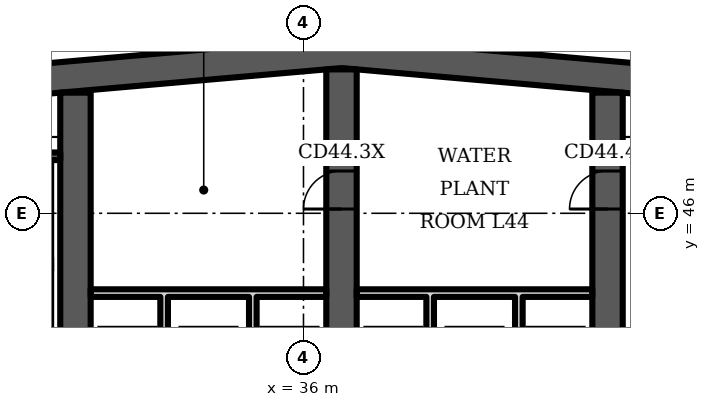
"""IFC4 building model, lengths in metres.
Left out: names, types, materials, properties, quantities, classifications, styles, units other than length and angle.
Written with IfcOpenShell. Run it as: python <this file> out.ifc"""

import sys

from ifc_helpers import new_model, si_unit, direction, frame, frame_2d, origin, place, context, subcontext, project, spatial, polyline, rectangle, outline, extrude, element, fill, save


model = new_model("IFC4")
c1 = context("Model", 3, precision=1e-05, world=origin(), true_north=direction((0.0, 1.0)))
c2 = subcontext(c1, "Body", "Model", "MODEL_VIEW")
j1 = project(units=[si_unit("LENGTHUNIT", "METRE"), si_unit("PLANEANGLEUNIT", "RADIAN")], contexts=[c1])
p1 = place(None, origin())
s1 = spatial("IfcSite", under=j1, at=p1, CompositionType="ELEMENT")
p2 = place(p1, origin())
s2 = spatial("IfcBuilding", under=s1, at=p2, CompositionType="ELEMENT")
p3 = place(p2, frame((0.0, 0.0, 180.7)))
s3 = spatial("IfcBuildingStorey", under=s2, at=p3, CompositionType="ELEMENT", Elevation=180.7)
p4 = place(p3, origin())
e1 = element("IfcWall", 1, at=p4, inside=s3, PredefinedType="SHEAR", context=c2, shape_type="SweptSolid", body=[
    extrude(outline(polyline([(16.0, 47.984), (37.0, 49.822), (58.0, 47.984), (58.0, 48.787), (37.0, 50.625), (16.0, 48.787), (16.0, 47.984)])), origin(), (0.0, 0.0, 1.0), 3.6),
])
p5 = place(p3, frame((30.0, 34.8, 0.0), z_axis=(0.0, 0.0, 1.0), x_axis=(0.0, 1.0, 0.0)))
e2 = element("IfcWall", 2, at=p5, inside=s3, PredefinedType="SHEAR", context=c2, shape_type="SweptSolid", body=[
    extrude(rectangle(XDim=14.374, YDim=0.8, at=frame_2d((7.187, 0.0))), origin(), (0.0, 0.0, 1.0), 3.6),
])
p6 = place(p5, frame((3.6, 0.0, 0.0)))
e3 = element("IfcOpeningElement", 3, at=p6, cuts=e2, PredefinedType="OPENING", context=c2, shape_type="SweptSolid", body=[
    extrude(rectangle(XDim=1.1, YDim=2.1, at=frame_2d((0.55, 1.05))), frame((0.0, 0.41, 0.0), z_axis=(0.0, -1.0, 0.0), x_axis=(1.0, 0.0, 0.0)), (0.0, 0.0, 1.0), 0.82),
])
p7 = place(p3, frame((37.0, 34.8, 0.0), z_axis=(0.0, 0.0, 1.0), x_axis=(0.0, 1.0, 0.0)))
e4 = element("IfcWall", 4, at=p7, inside=s3, PredefinedType="SHEAR", context=c2, shape_type="SweptSolid", body=[
    extrude(rectangle(XDim=14.987, YDim=0.8, at=frame_2d((7.493, 0.0))), origin(), (0.0, 0.0, 1.0), 3.6),
])
p8 = place(p7, frame((11.312, 0.0, 0.0)))
e5 = element("IfcOpeningElement", 5, at=p8, cuts=e4, PredefinedType="OPENING", context=c2, shape_type="SweptSolid", body=[
    extrude(rectangle(XDim=1.0, YDim=2.1, at=frame_2d((0.5, 1.05))), frame((0.0, 0.41, 0.0), z_axis=(0.0, -1.0, 0.0), x_axis=(1.0, 0.0, 0.0)), (0.0, 0.0, 1.0), 0.82),
])
p9 = place(p7, frame((3.6, 0.0, 0.0)))
e6 = element("IfcOpeningElement", 6, at=p9, cuts=e4, PredefinedType="OPENING", context=c2, shape_type="SweptSolid", body=[
    extrude(rectangle(XDim=1.1, YDim=2.1, at=frame_2d((0.55, 1.05))), frame((0.0, 0.41, 0.0), z_axis=(0.0, -1.0, 0.0), x_axis=(1.0, 0.0, 0.0)), (0.0, 0.0, 1.0), 0.82),
])
p10 = place(p3, frame((44.0, 34.8, 0.0), z_axis=(0.0, 0.0, 1.0), x_axis=(0.0, 1.0, 0.0)))
e7 = element("IfcWall", 7, at=p10, inside=s3, PredefinedType="SHEAR", context=c2, shape_type="SweptSolid", body=[
    extrude(rectangle(XDim=14.374, YDim=0.8, at=frame_2d((7.187, 0.0))), origin(), (0.0, 0.0, 1.0), 3.6),
])
p11 = place(p10, frame((11.312, 0.0, 0.0)))
e8 = element("IfcOpeningElement", 8, at=p11, cuts=e7, PredefinedType="OPENING", context=c2, shape_type="SweptSolid", body=[
    extrude(rectangle(XDim=1.0, YDim=2.1, at=frame_2d((0.5, 1.05))), frame((0.0, 0.41, 0.0), z_axis=(0.0, -1.0, 0.0), x_axis=(1.0, 0.0, 0.0)), (0.0, 0.0, 1.0), 0.82),
])
p12 = place(p10, frame((3.6, 0.0, 0.0)))
e9 = element("IfcOpeningElement", 9, at=p12, cuts=e7, PredefinedType="OPENING", context=c2, shape_type="SweptSolid", body=[
    extrude(rectangle(XDim=1.1, YDim=2.1, at=frame_2d((0.55, 1.05))), frame((0.0, 0.41, 0.0), z_axis=(0.0, -1.0, 0.0), x_axis=(1.0, 0.0, 0.0)), (0.0, 0.0, 1.0), 0.82),
])
p13 = place(p3, frame((25.75, 47.5, 0.0), z_axis=(0.0, 0.0, 1.0), x_axis=(1.0, 0.0, 0.0)))
e10 = element("IfcWall", 10, at=p13, inside=s3, PredefinedType="SHEAR", context=c2, shape_type="SweptSolid", body=[
    extrude(rectangle(XDim=3.85, YDim=0.2, at=frame_2d((1.925, 0.0))), origin(), (0.0, 0.0, 1.0), 3.2),
])
p14 = place(p3, frame((0.0, 0.0, -0.0)))
e11 = element("IfcWall", 11, at=p14, inside=s3, PredefinedType="PARTITIONING", context=c2, shape_type="SweptSolid", body=[
    extrude(outline(polyline([(32.433, 40.8), (32.233, 40.8), (32.233, 43.8), (30.4, 43.8), (30.4, 44.0), (36.6, 44.0), (36.6, 43.8), (34.767, 43.8), (34.767, 40.8), (34.567, 40.8), (34.567, 43.8), (32.433, 43.8), (32.433, 40.8)])), origin(), (0.0, 0.0, 1.0), 3.2),
])
p15 = place(p3, frame((0.0, 0.0, -0.0)))
e12 = element("IfcWall", 12, at=p15, inside=s3, PredefinedType="PARTITIONING", context=c2, shape_type="SweptSolid", body=[
    extrude(outline(polyline([(39.433, 40.8), (39.233, 40.8), (39.233, 43.8), (37.4, 43.8), (37.4, 44.0), (43.6, 44.0), (43.6, 43.8), (41.767, 43.8), (41.767, 40.8), (41.567, 40.8), (41.567, 43.8), (39.433, 43.8), (39.433, 40.8)])), origin(), (0.0, 0.0, 1.0), 3.2),
])
p16 = place(p8, origin())
e13 = element("IfcDoor", 13, at=p16, inside=s3, OperationType="SINGLE_SWING_LEFT", PredefinedType="DOOR", context=c2, shape_type="SweptSolid", body=[
    extrude(rectangle(XDim=1.0, YDim=2.1, at=frame_2d((0.5, 1.05))), frame((0.0, 0.4, 0.0), z_axis=(0.0, -1.0, 0.0), x_axis=(1.0, 0.0, 0.0)), (0.0, 0.0, 1.0), 0.8),
])
fill(e5, e13)
p17 = place(p11, origin())
e14 = element("IfcDoor", 14, at=p17, inside=s3, OperationType="SINGLE_SWING_LEFT", PredefinedType="DOOR", context=c2, shape_type="SweptSolid", body=[
    extrude(rectangle(XDim=1.0, YDim=2.1, at=frame_2d((0.5, 1.05))), frame((0.0, 0.4, 0.0), z_axis=(0.0, -1.0, 0.0), x_axis=(1.0, 0.0, 0.0)), (0.0, 0.0, 1.0), 0.8),
])
fill(e8, e14)
save(model, sys.argv[1])
